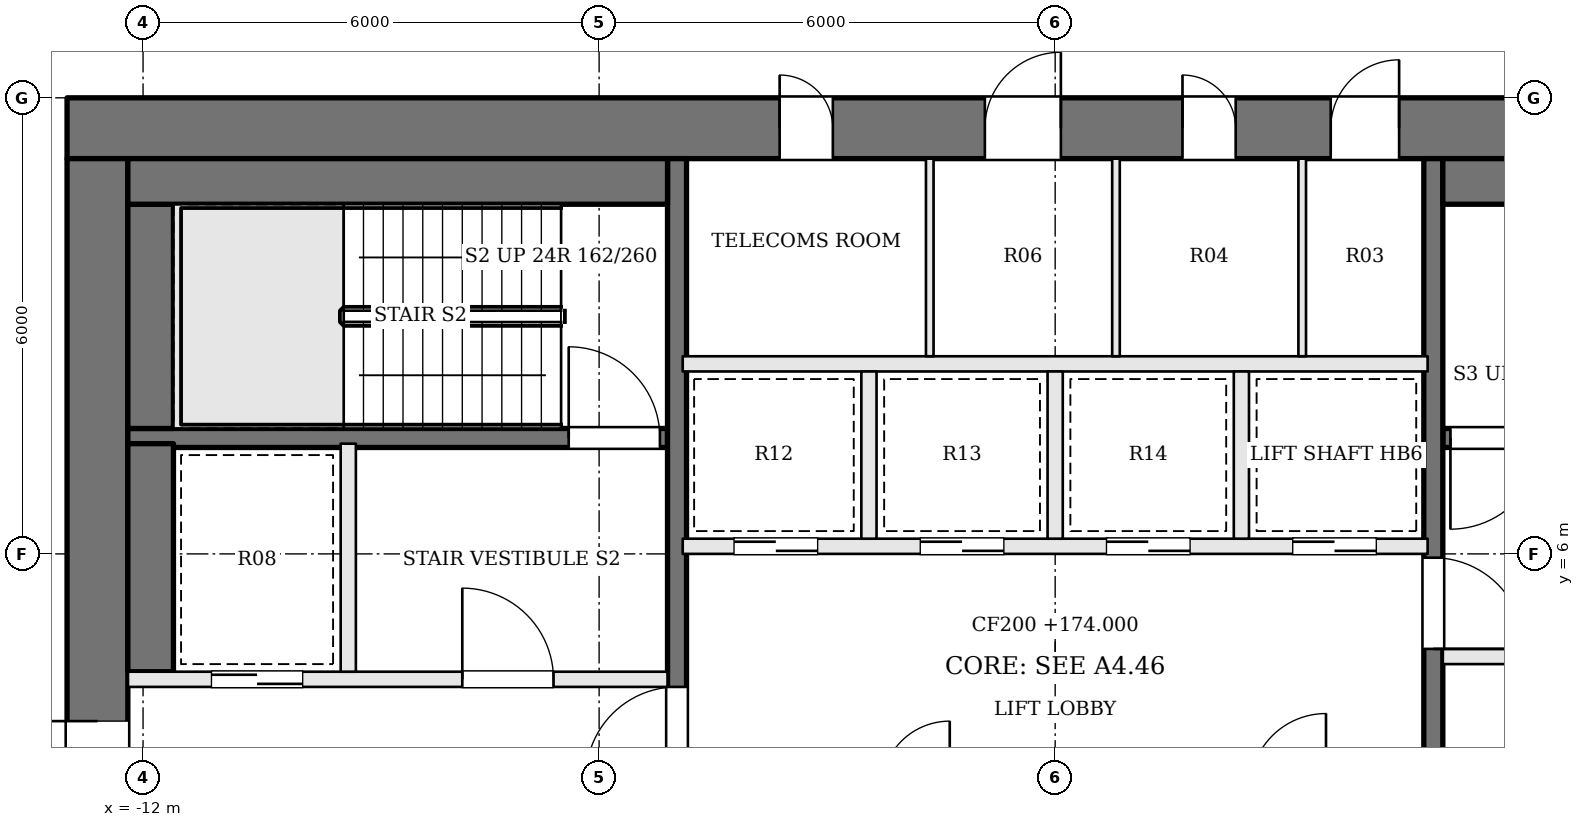
"""IFC4 building model, lengths in metres.
Left out: names, types, materials, properties, quantities, classifications, styles, units other than length and angle.
Written with IfcOpenShell. Run it as: python <this file> out.ifc"""

import sys

from ifc_helpers import new_model, si_unit, direction, frame, frame_2d, origin, place, context, subcontext, project, spatial, rectangle, extrude, element, fill, save


model = new_model("IFC4")
c1 = context("Model", 3, precision=1e-05, world=origin(), true_north=direction((0.0, 1.0)))
c2 = subcontext(c1, "Body", "Model", "MODEL_VIEW")
j1 = project(units=[si_unit("LENGTHUNIT", "METRE"), si_unit("PLANEANGLEUNIT", "RADIAN")], contexts=[c1])
p1 = place(None, origin())
s1 = spatial("IfcSite", under=j1, at=p1, CompositionType="ELEMENT")
p2 = place(p1, origin())
s2 = spatial("IfcBuilding", under=s1, at=p2, CompositionType="ELEMENT")
p3 = place(p2, frame((0.0, 0.0, 174.0)))
s3 = spatial("IfcBuildingStorey", under=s2, at=p3, CompositionType="ELEMENT", Elevation=174.0)
p4 = place(p3, frame((-13.0, 11.6, 0.0), z_axis=(0.0, 0.0, 1.0), x_axis=(1.0, 0.0, 0.0)))
e1 = element("IfcWall", 1, at=p4, inside=s3, PredefinedType="SHEAR", context=c2, shape_type="SweptSolid", body=[
    extrude(rectangle(XDim=26.0, YDim=0.8, at=frame_2d((13.0, 0.0))), origin(), (0.0, 0.0, 1.0), 3.9),
])
p5 = place(p4, frame((9.375, 0.0, 0.0)))
e2 = element("IfcOpeningElement", 2, at=p5, cuts=e1, PredefinedType="OPENING", context=c2, shape_type="SweptSolid", body=[
    extrude(rectangle(XDim=0.7, YDim=2.1, at=frame_2d((0.35, 1.05))), frame((0.0, 0.41, 0.0), z_axis=(0.0, -1.0, 0.0), x_axis=(1.0, 0.0, 0.0)), (0.0, 0.0, 1.0), 0.82),
])
p6 = place(p4, frame((12.075, 0.0, 0.0)))
e3 = element("IfcOpeningElement", 3, at=p6, cuts=e1, PredefinedType="OPENING", context=c2, shape_type="SweptSolid", body=[
    extrude(rectangle(XDim=1.0, YDim=2.1, at=frame_2d((0.5, 1.05))), frame((0.0, 0.41, 0.0), z_axis=(0.0, -1.0, 0.0), x_axis=(1.0, 0.0, 0.0)), (0.0, 0.0, 1.0), 0.82),
])
p7 = place(p4, frame((14.675, 0.0, 0.0)))
e4 = element("IfcOpeningElement", 4, at=p7, cuts=e1, PredefinedType="OPENING", context=c2, shape_type="SweptSolid", body=[
    extrude(rectangle(XDim=0.7, YDim=2.1, at=frame_2d((0.35, 1.05))), frame((0.0, 0.41, 0.0), z_axis=(0.0, -1.0, 0.0), x_axis=(1.0, 0.0, 0.0)), (0.0, 0.0, 1.0), 0.82),
])
p8 = place(p4, frame((16.625, 0.0, 0.0)))
e5 = element("IfcOpeningElement", 5, at=p8, cuts=e1, PredefinedType="OPENING", context=c2, shape_type="SweptSolid", body=[
    extrude(rectangle(XDim=0.9, YDim=2.1, at=frame_2d((0.45, 1.05))), frame((0.0, 0.41, 0.0), z_axis=(0.0, -1.0, 0.0), x_axis=(1.0, 0.0, 0.0)), (0.0, 0.0, 1.0), 0.82),
])
p9 = place(p3, frame((-12.6, -2.2, 0.0), z_axis=(0.0, 0.0, 1.0), x_axis=(0.0, 1.0, 0.0)))
e6 = element("IfcWall", 6, at=p9, inside=s3, PredefinedType="SHEAR", context=c2, shape_type="SweptSolid", body=[
    extrude(rectangle(XDim=13.4, YDim=0.8, at=frame_2d((6.7, 0.0))), origin(), (0.0, 0.0, 1.0), 3.9),
])
p10 = place(p9, frame((4.2, 0.0, 0.0)))
e7 = element("IfcOpeningElement", 7, at=p10, cuts=e6, PredefinedType="OPENING", context=c2, shape_type="SweptSolid", body=[
    extrude(rectangle(XDim=1.8, YDim=2.1, at=frame_2d((0.9, 1.05))), frame((0.0, 0.41, 0.0), z_axis=(0.0, -1.0, 0.0), x_axis=(1.0, 0.0, 0.0)), (0.0, 0.0, 1.0), 0.82),
])
p11 = place(p3, frame((12.2, 7.525, 0.0), z_axis=(0.0, 0.0, 1.0), x_axis=(-1.0, 0.0, 0.0)))
e8 = element("IfcWall", 8, at=p11, inside=s3, PredefinedType="SOLIDWALL", context=c2, shape_type="SweptSolid", body=[
    extrude(rectangle(XDim=7.1, YDim=0.25, at=frame_2d((3.55, 0.0))), origin(), (0.0, 0.0, 1.0), 3.7),
])
p12 = place(p11, frame((5.8, 0.0, 0.0)))
e9 = element("IfcOpeningElement", 9, at=p12, cuts=e8, PredefinedType="OPENING", context=c2, shape_type="SweptSolid", body=[
    extrude(rectangle(XDim=1.2, YDim=2.1, at=frame_2d((0.6, 1.05))), frame((0.0, 0.135, 0.0), z_axis=(0.0, -1.0, 0.0), x_axis=(1.0, 0.0, 0.0)), (0.0, 0.0, 1.0), 0.27),
])
p13 = place(p3, frame((-12.2, 4.35, 0.0), z_axis=(0.0, 0.0, 1.0), x_axis=(1.0, 0.0, 0.0)))
e10 = element("IfcWall", 10, at=p13, inside=s3, PredefinedType="SOLIDWALL", context=c2, shape_type="SweptSolid", body=[
    extrude(rectangle(XDim=7.1, YDim=0.2, at=frame_2d((3.55, 0.0))), origin(), (0.0, 0.0, 1.0), 3.7),
])
p14 = place(p13, frame((4.4, 0.0, 0.0)))
e11 = element("IfcOpeningElement", 11, at=p14, cuts=e10, PredefinedType="OPENING", context=c2, shape_type="SweptSolid", body=[
    extrude(rectangle(XDim=1.2, YDim=2.1, at=frame_2d((0.6, 1.05))), frame((0.0, 0.11, 0.0), z_axis=(0.0, -1.0, 0.0), x_axis=(1.0, 0.0, 0.0)), (0.0, 0.0, 1.0), 0.22),
])
p15 = place(p13, frame((1.1, 0.0, 0.0)))
e12 = element("IfcOpeningElement", 12, at=p15, cuts=e10, PredefinedType="OPENING", context=c2, shape_type="SweptSolid", body=[
    extrude(rectangle(XDim=1.2, YDim=2.1, at=frame_2d((0.6, 1.05))), frame((0.0, 0.11, 0.0), z_axis=(0.0, -1.0, 0.0), x_axis=(1.0, 0.0, 0.0)), (0.0, 0.0, 1.0), 0.22),
])
p16 = place(p3, frame((12.2, 4.65, 0.0), z_axis=(0.0, 0.0, 1.0), x_axis=(-1.0, 0.0, 0.0)))
e13 = element("IfcWall", 13, at=p16, inside=s3, PredefinedType="SOLIDWALL", context=c2, shape_type="SweptSolid", body=[
    extrude(rectangle(XDim=7.1, YDim=0.2, at=frame_2d((3.55, 0.0))), origin(), (0.0, 0.0, 1.0), 3.7),
])
p17 = place(p16, frame((4.4, 0.0, 0.0)))
e14 = element("IfcOpeningElement", 14, at=p17, cuts=e13, PredefinedType="OPENING", context=c2, shape_type="SweptSolid", body=[
    extrude(rectangle(XDim=1.2, YDim=2.1, at=frame_2d((0.6, 1.05))), frame((0.0, 0.11, 0.0), z_axis=(0.0, -1.0, 0.0), x_axis=(1.0, 0.0, 0.0)), (0.0, 0.0, 1.0), 0.22),
])
p18 = place(p16, frame((1.1, 0.0, 0.0)))
e15 = element("IfcOpeningElement", 15, at=p18, cuts=e13, PredefinedType="OPENING", context=c2, shape_type="SweptSolid", body=[
    extrude(rectangle(XDim=1.2, YDim=2.1, at=frame_2d((0.6, 1.05))), frame((0.0, 0.11, 0.0), z_axis=(0.0, -1.0, 0.0), x_axis=(1.0, 0.0, 0.0)), (0.0, 0.0, 1.0), 0.22),
])
p19 = place(p3, frame((-12.2, 7.525, 0.0), z_axis=(0.0, 0.0, 1.0), x_axis=(1.0, 0.0, 0.0)))
e16 = element("IfcWall", 16, at=p19, inside=s3, PredefinedType="SOLIDWALL", context=c2, shape_type="SweptSolid", body=[
    extrude(rectangle(XDim=7.1, YDim=0.25, at=frame_2d((3.55, 0.0))), origin(), (0.0, 0.0, 1.0), 3.7),
])
p20 = place(p19, frame((5.8, 0.0, 0.0)))
e17 = element("IfcOpeningElement", 17, at=p20, cuts=e16, PredefinedType="OPENING", context=c2, shape_type="SweptSolid", body=[
    extrude(rectangle(XDim=1.2, YDim=2.1, at=frame_2d((0.6, 1.05))), frame((0.0, 0.135, 0.0), z_axis=(0.0, -1.0, 0.0), x_axis=(1.0, 0.0, 0.0)), (0.0, 0.0, 1.0), 0.27),
])
p21 = place(p3, frame((-9.3, 4.45, 0.0), z_axis=(0.0, 0.0, 1.0), x_axis=(0.0, 1.0, 0.0)))
e18 = element("IfcWall", 18, at=p21, inside=s3, PredefinedType="SOLIDWALL", context=c2, shape_type="SweptSolid", body=[
    extrude(rectangle(XDim=3.0, YDim=0.2, at=frame_2d((1.5, 0.0))), origin(), (0.0, 0.0, 1.0), 3.7),
])
p22 = place(p3, frame((-4.975, -2.2, 0.0), z_axis=(0.0, 0.0, 1.0), x_axis=(0.0, 1.0, 0.0)))
e19 = element("IfcWall", 19, at=p22, inside=s3, PredefinedType="SOLIDWALL", context=c2, shape_type="SweptSolid", body=[
    extrude(rectangle(XDim=13.4, YDim=0.25, at=frame_2d((6.7, 0.0))), origin(), (0.0, 0.0, 1.0), 3.7),
])
p23 = place(p22, frame((5.25, 0.0, 0.0)))
e20 = element("IfcOpeningElement", 20, at=p23, cuts=e19, PredefinedType="OPENING", context=c2, shape_type="SweptSolid", body=[
    extrude(rectangle(XDim=1.2, YDim=2.1, at=frame_2d((0.6, 1.05))), frame((0.0, 0.135, 0.0), z_axis=(0.0, -1.0, 0.0), x_axis=(1.0, 0.0, 0.0)), (0.0, 0.0, 1.0), 0.27),
])
p24 = place(p3, frame((4.975, 11.2, 0.0), z_axis=(0.0, 0.0, 1.0), x_axis=(0.0, -1.0, 0.0)))
e21 = element("IfcWall", 21, at=p24, inside=s3, PredefinedType="SOLIDWALL", context=c2, shape_type="SweptSolid", body=[
    extrude(rectangle(XDim=13.4, YDim=0.25, at=frame_2d((6.7, 0.0))), origin(), (0.0, 0.0, 1.0), 3.7),
])
p25 = place(p24, frame((5.25, 0.0, 0.0)))
e22 = element("IfcOpeningElement", 22, at=p25, cuts=e21, PredefinedType="OPENING", context=c2, shape_type="SweptSolid", body=[
    extrude(rectangle(XDim=1.2, YDim=2.1, at=frame_2d((0.6, 1.05))), frame((0.0, 0.135, 0.0), z_axis=(0.0, -1.0, 0.0), x_axis=(1.0, 0.0, 0.0)), (0.0, 0.0, 1.0), 0.27),
])
p26 = place(p3, frame((-11.9, 4.45, 0.0), z_axis=(0.0, 0.0, 1.0), x_axis=(0.0, 1.0, 0.0)))
e23 = element("IfcWall", 23, at=p26, inside=s3, PredefinedType="SOLIDWALL", context=c2, shape_type="SweptSolid", body=[
    extrude(rectangle(XDim=3.0, YDim=0.6, at=frame_2d((1.5, 0.0))), origin(), (0.0, 0.0, 1.0), 3.7),
])
p27 = place(p3, frame((-11.9, 7.65, 0.0), z_axis=(0.0, 0.0, 1.0), x_axis=(0.0, 1.0, 0.0)))
e24 = element("IfcWall", 24, at=p27, inside=s3, PredefinedType="SOLIDWALL", context=c2, shape_type="SweptSolid", body=[
    extrude(rectangle(XDim=2.95, YDim=0.6, at=frame_2d((1.475, 0.0))), origin(), (0.0, 0.0, 1.0), 3.7),
])
for number, where, z_axis, x_axis in (
    (25, (-12.2, 10.9, 0.0), (0.0, 0.0, 1.0), (1.0, 0.0, 0.0)),
    (26, (12.2, 10.9, 0.0), (0.0, 0.0, 1.0), (-1.0, 0.0, 0.0)),
):
    element("IfcWall", number, at=place(p3, frame(where, z_axis=z_axis, x_axis=x_axis)), inside=s3, PredefinedType="SOLIDWALL", context=c2, shape_type="SweptSolid", body=[
        extrude(rectangle(XDim=7.1, YDim=0.6, at=frame_2d((3.55, 0.0))), origin(), (0.0, 0.0, 1.0), 3.7),
    ])
p28 = place(p3, frame((-4.9, 6.1, 0.0), z_axis=(0.0, 0.0, 1.0), x_axis=(1.0, 0.0, 0.0)))
e27 = element("IfcWall", 27, at=p28, inside=s3, PredefinedType="SOLIDWALL", context=c2, shape_type="SweptSolid", body=[
    extrude(rectangle(XDim=9.8, YDim=0.2, at=frame_2d((4.9, 0.0))), origin(), (0.0, 0.0, 1.0), 3.7),
])
p29 = place(p28, frame((0.675, 0.0, 0.0)))
e28 = element("IfcOpeningElement", 28, at=p29, cuts=e27, PredefinedType="OPENING", context=c2, shape_type="SweptSolid", body=[
    extrude(rectangle(XDim=1.1, YDim=2.1, at=frame_2d((0.55, 1.05))), frame((0.0, 0.11, 0.0), z_axis=(0.0, -1.0, 0.0), x_axis=(1.0, 0.0, 0.0)), (0.0, 0.0, 1.0), 0.22),
])
p30 = place(p28, frame((3.125, 0.0, 0.0)))
e29 = element("IfcOpeningElement", 29, at=p30, cuts=e27, PredefinedType="OPENING", context=c2, shape_type="SweptSolid", body=[
    extrude(rectangle(XDim=1.1, YDim=2.1, at=frame_2d((0.55, 1.05))), frame((0.0, 0.11, 0.0), z_axis=(0.0, -1.0, 0.0), x_axis=(1.0, 0.0, 0.0)), (0.0, 0.0, 1.0), 0.22),
])
p31 = place(p28, frame((5.575, 0.0, 0.0)))
e30 = element("IfcOpeningElement", 30, at=p31, cuts=e27, PredefinedType="OPENING", context=c2, shape_type="SweptSolid", body=[
    extrude(rectangle(XDim=1.1, YDim=2.1, at=frame_2d((0.55, 1.05))), frame((0.0, 0.11, 0.0), z_axis=(0.0, -1.0, 0.0), x_axis=(1.0, 0.0, 0.0)), (0.0, 0.0, 1.0), 0.22),
])
p32 = place(p28, frame((8.025, 0.0, 0.0)))
e31 = element("IfcOpeningElement", 31, at=p32, cuts=e27, PredefinedType="OPENING", context=c2, shape_type="SweptSolid", body=[
    extrude(rectangle(XDim=1.1, YDim=2.1, at=frame_2d((0.55, 1.05))), frame((0.0, 0.11, 0.0), z_axis=(0.0, -1.0, 0.0), x_axis=(1.0, 0.0, 0.0)), (0.0, 0.0, 1.0), 0.22),
])
p33 = place(p3, frame((-4.9, 8.5, 0.0), z_axis=(0.0, 0.0, 1.0), x_axis=(1.0, 0.0, 0.0)))
e32 = element("IfcWall", 32, at=p33, inside=s3, PredefinedType="SOLIDWALL", context=c2, shape_type="SweptSolid", body=[
    extrude(rectangle(XDim=9.8, YDim=0.2, at=frame_2d((4.9, 0.0))), origin(), (0.0, 0.0, 1.0), 3.7),
])
for number, where, z_axis, x_axis in (
    (33, (-2.45, 6.2, 0.0), (0.0, 0.0, 1.0), (0.0, 1.0, 0.0)),
    (34, (0.0, 6.2, 0.0), (0.0, 0.0, 1.0), (0.0, 1.0, 0.0)),
    (35, (2.45, 6.2, 0.0), (0.0, 0.0, 1.0), (0.0, 1.0, 0.0)),
):
    element("IfcWall", number, at=place(p3, frame(where, z_axis=z_axis, x_axis=x_axis)), inside=s3, PredefinedType="SOLIDWALL", context=c2, shape_type="SweptSolid", body=[
        extrude(rectangle(XDim=2.2, YDim=0.2, at=frame_2d((1.1, 0.0))), origin(), (0.0, 0.0, 1.0), 3.7),
    ])
for number, where, z_axis, x_axis in (
    (36, (-1.65, 8.6, 0.0), (0.0, 0.0, 1.0), (0.0, 1.0, 0.0)),
    (37, (0.8, 8.6, 0.0), (0.0, 0.0, 1.0), (0.0, 1.0, 0.0)),
    (38, (3.25, 8.6, 0.0), (0.0, 0.0, 1.0), (0.0, 1.0, 0.0)),
):
    element("IfcWall", number, at=place(p3, frame(where, z_axis=z_axis, x_axis=x_axis)), inside=s3, PredefinedType="PARTITIONING", context=c2, shape_type="SweptSolid", body=[
        extrude(rectangle(XDim=2.6, YDim=0.1, at=frame_2d((1.3, 0.0))), origin(), (0.0, 0.0, 1.0), 3.7),
    ])
p34 = place(p10, origin())
e39 = element("IfcDoor", 39, at=p34, inside=s3, OperationType="DOUBLE_DOOR_SINGLE_SWING", PredefinedType="DOOR", context=c2, shape_type="SweptSolid", body=[
    extrude(rectangle(XDim=1.8, YDim=2.1, at=frame_2d((0.9, 1.05))), frame((0.0, 0.025, 0.0), z_axis=(0.0, -1.0, 0.0), x_axis=(1.0, 0.0, 0.0)), (0.0, 0.0, 1.0), 0.05),
])
fill(e7, e39)
p35 = place(p23, origin())
e40 = element("IfcDoor", 40, at=p35, inside=s3, OperationType="SINGLE_SWING_LEFT", PredefinedType="DOOR", context=c2, shape_type="SweptSolid", body=[
    extrude(rectangle(XDim=1.2, YDim=2.1, at=frame_2d((0.6, 1.05))), frame((0.0, 0.025, 0.0), z_axis=(0.0, -1.0, 0.0), x_axis=(1.0, 0.0, 0.0)), (0.0, 0.0, 1.0), 0.05),
])
fill(e20, e40)
p36 = place(p25, origin())
e41 = element("IfcDoor", 41, at=p36, inside=s3, OperationType="SINGLE_SWING_RIGHT", PredefinedType="DOOR", context=c2, shape_type="SweptSolid", body=[
    extrude(rectangle(XDim=1.2, YDim=2.1, at=frame_2d((0.6, 1.05))), frame((0.0, 0.025, 0.0), z_axis=(0.0, -1.0, 0.0), x_axis=(1.0, 0.0, 0.0)), (0.0, 0.0, 1.0), 0.05),
])
fill(e22, e41)
p37 = place(p14, origin())
e42 = element("IfcDoor", 42, at=p37, inside=s3, OperationType="SINGLE_SWING_LEFT", PredefinedType="DOOR", context=c2, shape_type="SweptSolid", body=[
    extrude(rectangle(XDim=1.2, YDim=2.1, at=frame_2d((0.6, 1.05))), frame((0.0, 0.025, 0.0), z_axis=(0.0, -1.0, 0.0), x_axis=(1.0, 0.0, 0.0)), (0.0, 0.0, 1.0), 0.05),
])
fill(e11, e42)
p38 = place(p12, origin())
e43 = element("IfcDoor", 43, at=p38, inside=s3, OperationType="SINGLE_SWING_RIGHT", PredefinedType="DOOR", context=c2, shape_type="SweptSolid", body=[
    extrude(rectangle(XDim=1.2, YDim=2.1, at=frame_2d((0.6, 1.05))), frame((0.0, 0.025, 0.0), z_axis=(0.0, -1.0, 0.0), x_axis=(1.0, 0.0, 0.0)), (0.0, 0.0, 1.0), 0.05),
])
fill(e9, e43)
p39 = place(p20, origin())
e44 = element("IfcDoor", 44, at=p39, inside=s3, OperationType="SINGLE_SWING_LEFT", PredefinedType="DOOR", context=c2, shape_type="SweptSolid", body=[
    extrude(rectangle(XDim=1.2, YDim=2.1, at=frame_2d((0.6, 1.05))), frame((0.0, 0.025, 0.0), z_axis=(0.0, -1.0, 0.0), x_axis=(1.0, 0.0, 0.0)), (0.0, 0.0, 1.0), 0.05),
])
fill(e17, e44)
p40 = place(p15, origin())
e45 = element("IfcDoor", 45, at=p40, inside=s3, OperationType="SLIDING_TO_RIGHT", PredefinedType="DOOR", context=c2, shape_type="SweptSolid", body=[
    extrude(rectangle(XDim=1.2, YDim=2.1, at=frame_2d((0.6, 1.05))), frame((0.0, 0.025, 0.0), z_axis=(0.0, -1.0, 0.0), x_axis=(1.0, 0.0, 0.0)), (0.0, 0.0, 1.0), 0.05),
])
fill(e12, e45)
p41 = place(p29, origin())
e46 = element("IfcDoor", 46, at=p41, inside=s3, OperationType="SLIDING_TO_RIGHT", PredefinedType="DOOR", context=c2, shape_type="SweptSolid", body=[
    extrude(rectangle(XDim=1.1, YDim=2.1, at=frame_2d((0.55, 1.05))), frame((0.0, 0.025, 0.0), z_axis=(0.0, -1.0, 0.0), x_axis=(1.0, 0.0, 0.0)), (0.0, 0.0, 1.0), 0.05),
])
fill(e28, e46)
p42 = place(p30, origin())
e47 = element("IfcDoor", 47, at=p42, inside=s3, OperationType="SLIDING_TO_LEFT", PredefinedType="DOOR", context=c2, shape_type="SweptSolid", body=[
    extrude(rectangle(XDim=1.1, YDim=2.1, at=frame_2d((0.55, 1.05))), frame((0.0, 0.025, 0.0), z_axis=(0.0, -1.0, 0.0), x_axis=(1.0, 0.0, 0.0)), (0.0, 0.0, 1.0), 0.05),
])
fill(e29, e47)
p43 = place(p31, origin())
e48 = element("IfcDoor", 48, at=p43, inside=s3, OperationType="SLIDING_TO_RIGHT", PredefinedType="DOOR", context=c2, shape_type="SweptSolid", body=[
    extrude(rectangle(XDim=1.1, YDim=2.1, at=frame_2d((0.55, 1.05))), frame((0.0, 0.025, 0.0), z_axis=(0.0, -1.0, 0.0), x_axis=(1.0, 0.0, 0.0)), (0.0, 0.0, 1.0), 0.05),
])
fill(e30, e48)
p44 = place(p32, origin())
e49 = element("IfcDoor", 49, at=p44, inside=s3, OperationType="SLIDING_TO_LEFT", PredefinedType="DOOR", context=c2, shape_type="SweptSolid", body=[
    extrude(rectangle(XDim=1.1, YDim=2.1, at=frame_2d((0.55, 1.05))), frame((0.0, 0.025, 0.0), z_axis=(0.0, -1.0, 0.0), x_axis=(1.0, 0.0, 0.0)), (0.0, 0.0, 1.0), 0.05),
])
fill(e31, e49)
p45 = place(p5, origin())
e50 = element("IfcDoor", 50, at=p45, inside=s3, OperationType="SINGLE_SWING_LEFT", PredefinedType="DOOR", context=c2, shape_type="SweptSolid", body=[
    extrude(rectangle(XDim=0.7, YDim=2.1, at=frame_2d((0.35, 1.05))), frame((0.0, 0.025, 0.0), z_axis=(0.0, -1.0, 0.0), x_axis=(1.0, 0.0, 0.0)), (0.0, 0.0, 1.0), 0.05),
])
fill(e2, e50)
p46 = place(p6, origin())
e51 = element("IfcDoor", 51, at=p46, inside=s3, OperationType="SINGLE_SWING_RIGHT", PredefinedType="DOOR", context=c2, shape_type="SweptSolid", body=[
    extrude(rectangle(XDim=1.0, YDim=2.1, at=frame_2d((0.5, 1.05))), frame((0.0, 0.025, 0.0), z_axis=(0.0, -1.0, 0.0), x_axis=(1.0, 0.0, 0.0)), (0.0, 0.0, 1.0), 0.05),
])
fill(e3, e51)
p47 = place(p7, origin())
e52 = element("IfcDoor", 52, at=p47, inside=s3, OperationType="SINGLE_SWING_LEFT", PredefinedType="DOOR", context=c2, shape_type="SweptSolid", body=[
    extrude(rectangle(XDim=0.7, YDim=2.1, at=frame_2d((0.35, 1.05))), frame((0.0, 0.025, 0.0), z_axis=(0.0, -1.0, 0.0), x_axis=(1.0, 0.0, 0.0)), (0.0, 0.0, 1.0), 0.05),
])
fill(e4, e52)
p48 = place(p8, origin())
e53 = element("IfcDoor", 53, at=p48, inside=s3, OperationType="SINGLE_SWING_RIGHT", PredefinedType="DOOR", context=c2, shape_type="SweptSolid", body=[
    extrude(rectangle(XDim=0.9, YDim=2.1, at=frame_2d((0.45, 1.05))), frame((0.0, 0.025, 0.0), z_axis=(0.0, -1.0, 0.0), x_axis=(1.0, 0.0, 0.0)), (0.0, 0.0, 1.0), 0.05),
])
fill(e5, e53)
save(model, sys.argv[1])
